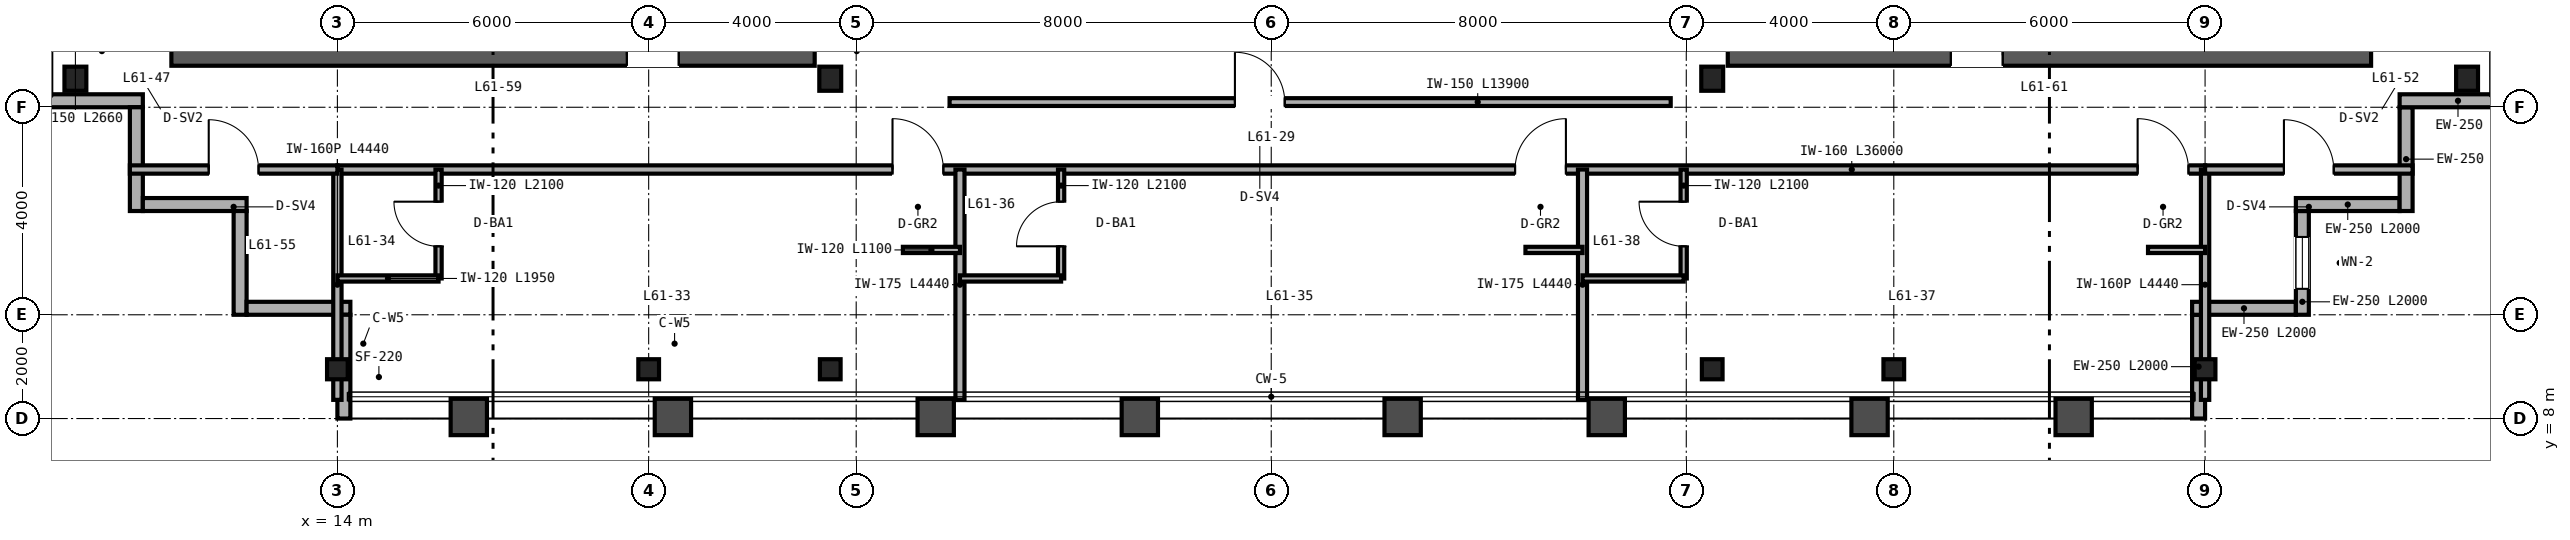
"""IFC4 building model, lengths in metres.
Left out: names, types, materials, properties, quantities, classifications, styles, units other than length and angle.
Written with IfcOpenShell. Run it as: python <this file> out.ifc"""

import sys

from ifc_helpers import new_model, si_unit, direction, frame, frame_2d, origin, origin_2d, place, context, subcontext, project, spatial, rectangle, i_section, extrude, source, transform, mapped, element, fill, save


model = new_model("IFC4")
c1 = context("Model", 3, precision=1e-05, world=origin(), true_north=direction((0.0, 1.0)))
c2 = subcontext(c1, "Body", "Model", "MODEL_VIEW")
j1 = project(units=[si_unit("LENGTHUNIT", "METRE"), si_unit("PLANEANGLEUNIT", "RADIAN")], contexts=[c1])
p1 = place(None, origin())
s1 = spatial("IfcSite", under=j1, at=p1, CompositionType="ELEMENT")
p2 = place(p1, origin())
s2 = spatial("IfcBuilding", under=s1, at=p2, CompositionType="ELEMENT")
p3 = place(p2, frame((0.0, 0.0, 243.6)))
s3 = spatial("IfcBuildingStorey", under=s2, at=p3, CompositionType="ELEMENT", Elevation=243.6)
p4 = place(p3, frame((10.8, 15.0, 0.0), z_axis=(0.0, 0.0, 1.0), x_axis=(1.0, 0.0, 0.0)))
e1 = element("IfcWall", 1, at=p4, inside=s3, PredefinedType="SHEAR", context=c2, shape_type="SweptSolid", body=[
    extrude(rectangle(XDim=12.4, YDim=0.4, at=frame_2d((6.2, 0.0))), origin(), (0.0, 0.0, 1.0), 3.28),
])
p5 = place(p4, frame((8.78, 0.0, 0.0)))
e2 = element("IfcOpeningElement", 2, at=p5, cuts=e1, PredefinedType="OPENING", context=c2, shape_type="SweptSolid", body=[
    extrude(rectangle(XDim=1.0, YDim=2.15, at=frame_2d((0.5, 1.075))), frame((0.0, 0.21, 0.0), z_axis=(0.0, -1.0, 0.0), x_axis=(1.0, 0.0, 0.0)), (0.0, 0.0, 1.0), 0.42),
])
p6 = place(p3, frame((40.8, 15.0, 0.0), z_axis=(0.0, 0.0, 1.0), x_axis=(1.0, 0.0, 0.0)))
e3 = element("IfcWall", 3, at=p6, inside=s3, PredefinedType="SHEAR", context=c2, shape_type="SweptSolid", body=[
    extrude(rectangle(XDim=12.4, YDim=0.4, at=frame_2d((6.2, 0.0))), origin(), (0.0, 0.0, 1.0), 3.28),
])
p7 = place(p6, frame((4.3, 0.0, 0.0)))
e4 = element("IfcOpeningElement", 4, at=p7, cuts=e3, PredefinedType="OPENING", context=c2, shape_type="SweptSolid", body=[
    extrude(rectangle(XDim=1.0, YDim=2.15, at=frame_2d((0.5, 1.075))), frame((0.0, 0.21, 0.0), z_axis=(0.0, -1.0, 0.0), x_axis=(1.0, 0.0, 0.0)), (0.0, 0.0, 1.0), 0.42),
])
m1 = source(origin(), c2, "Body", "SweptSolid", [
    extrude(i_section(OverallWidth=0.422, OverallDepth=0.465, WebThickness=0.045, FlangeThickness=0.073, FilletRadius=0.025, at=origin_2d()), origin(), (0.0, 0.0, 1.0), 3.28),
])
for number, where, z_axis, x_axis in (
    (5, (8.95, 14.55, 0.0), (0.0, 0.0, 1.0), (1.0, 0.0, 0.0)),
    (6, (23.5, 14.55, 0.0), (0.0, 0.0, 1.0), (1.0, 0.0, 0.0)),
    (7, (40.5, 14.55, 0.0), (0.0, 0.0, 1.0), (1.0, 0.0, 0.0)),
    (8, (55.05, 14.55, 0.0), (0.0, 0.0, 1.0), (1.0, 0.0, 0.0)),
):
    element("IfcColumn", number, at=place(p3, frame(where, z_axis=z_axis, x_axis=x_axis)), inside=s3, PredefinedType="COLUMN", context=c2, shape_type="MappedRepresentation", body=[
        mapped(m1, transform((0.0, 0.0, 0.0), scale=1.0)),
    ])
m2 = source(origin(), c2, "Body", "SweptSolid", [
    extrude(i_section(OverallWidth=0.399, OverallDepth=0.387, WebThickness=0.021, FlangeThickness=0.033, FilletRadius=0.025, at=origin_2d()), origin(), (0.0, 0.0, 1.0), 3.28),
])
for number, where, z_axis, x_axis in (
    (9, (14.0, 8.95, 0.0), (0.0, 0.0, 1.0), (1.0, 0.0, 0.0)),
    (10, (20.0, 8.95, 0.0), (0.0, 0.0, 1.0), (1.0, 0.0, 0.0)),
    (11, (23.5, 8.95, 0.0), (0.0, 0.0, 1.0), (1.0, 0.0, 0.0)),
    (12, (40.5, 8.95, 0.0), (0.0, 0.0, 1.0), (1.0, 0.0, 0.0)),
    (13, (44.0, 8.95, 0.0), (0.0, 0.0, 1.0), (1.0, 0.0, 0.0)),
    (14, (50.0, 8.95, 0.0), (0.0, 0.0, 1.0), (1.0, 0.0, 0.0)),
):
    element("IfcColumn", number, at=place(p3, frame(where, z_axis=z_axis, x_axis=x_axis)), inside=s3, PredefinedType="COLUMN", context=c2, shape_type="MappedRepresentation", body=[
        mapped(m2, transform((0.0, 0.0, 0.0), scale=1.0)),
    ])
p8 = place(p3, frame((49.875, 8.0, 0.0), z_axis=(0.0, 0.0, 1.0), x_axis=(0.0, 1.0, 0.0)))
e15 = element("IfcWall", 15, at=p8, inside=s3, PredefinedType="SOLIDWALL", context=c2, shape_type="SweptSolid", body=[
    extrude(rectangle(XDim=2.0, YDim=0.25, at=frame_2d((1.0, 0.0))), origin(), (0.0, 0.0, 1.0), 2.587),
])
p9 = place(p3, frame((49.75, 10.125, 0.0), z_axis=(0.0, 0.0, 1.0), x_axis=(1.0, 0.0, 0.0)))
e16 = element("IfcWall", 16, at=p9, inside=s3, PredefinedType="SOLIDWALL", context=c2, shape_type="SweptSolid", body=[
    extrude(rectangle(XDim=2.0, YDim=0.25, at=frame_2d((1.0, 0.0))), origin(), (0.0, 0.0, 1.0), 3.28),
])
p10 = place(p3, frame((51.875, 10.0, 0.0), z_axis=(0.0, 0.0, 1.0), x_axis=(0.0, 1.0, 0.0)))
e17 = element("IfcWall", 17, at=p10, inside=s3, PredefinedType="SOLIDWALL", context=c2, shape_type="SweptSolid", body=[
    extrude(rectangle(XDim=2.0, YDim=0.25, at=frame_2d((1.0, 0.0))), origin(), (0.0, 0.0, 1.0), 3.28),
])
p11 = place(p10, frame((0.5, 0.0, 0.85)))
e18 = element("IfcOpeningElement", 18, at=p11, cuts=e17, PredefinedType="OPENING", context=c2, shape_type="SweptSolid", body=[
    extrude(rectangle(XDim=1.0, YDim=1.9, at=frame_2d((0.5, 0.95))), frame((0.0, 0.135, 0.0), z_axis=(0.0, -1.0, 0.0), x_axis=(1.0, 0.0, 0.0)), (0.0, 0.0, 1.0), 0.27),
])
for number, where, z_axis, x_axis in (
    (19, (51.75, 12.125, 0.0), (0.0, 0.0, 1.0), (1.0, 0.0, 0.0)),
    (20, (53.875, 12.0, 0.0), (0.0, 0.0, 1.0), (0.0, 1.0, 0.0)),
):
    element("IfcWall", number, at=place(p3, frame(where, z_axis=z_axis, x_axis=x_axis)), inside=s3, PredefinedType="SOLIDWALL", context=c2, shape_type="SweptSolid", body=[
        extrude(rectangle(XDim=2.0, YDim=0.25, at=frame_2d((1.0, 0.0))), origin(), (0.0, 0.0, 1.0), 3.28),
    ])
for number, where, z_axis, x_axis in (
    (21, (53.75, 14.125, 0.0), (0.0, 0.0, 1.0), (1.0, 0.0, 0.0)),
    (22, (8.0, 14.125, 0.0), (0.0, 0.0, 1.0), (1.0, 0.0, 0.0)),
):
    element("IfcWall", number, at=place(p3, frame(where, z_axis=z_axis, x_axis=x_axis)), inside=s3, PredefinedType="SOLIDWALL", context=c2, shape_type="SweptSolid", body=[
        extrude(rectangle(XDim=2.25, YDim=0.25, at=frame_2d((1.125, 0.0))), origin(), (0.0, 0.0, 1.0), 3.28),
    ])
for number, where, z_axis, x_axis in (
    (23, (10.125, 14.0, 0.0), (0.0, 0.0, 1.0), (0.0, -1.0, 0.0)),
    (24, (10.25, 12.125, 0.0), (0.0, 0.0, 1.0), (1.0, 0.0, 0.0)),
    (25, (12.125, 12.0, 0.0), (0.0, 0.0, 1.0), (0.0, -1.0, 0.0)),
    (26, (12.25, 10.125, 0.0), (0.0, 0.0, 1.0), (1.0, 0.0, 0.0)),
):
    element("IfcWall", number, at=place(p3, frame(where, z_axis=z_axis, x_axis=x_axis)), inside=s3, PredefinedType="SOLIDWALL", context=c2, shape_type="SweptSolid", body=[
        extrude(rectangle(XDim=2.0, YDim=0.25, at=frame_2d((1.0, 0.0))), origin(), (0.0, 0.0, 1.0), 3.28),
    ])
p12 = place(p3, frame((14.125, 10.0, 0.0), z_axis=(0.0, 0.0, 1.0), x_axis=(0.0, -1.0, 0.0)))
e27 = element("IfcWall", 27, at=p12, inside=s3, PredefinedType="SOLIDWALL", context=c2, shape_type="SweptSolid", body=[
    extrude(rectangle(XDim=2.0, YDim=0.25, at=frame_2d((1.0, 0.0))), origin(), (0.0, 0.0, 1.0), 2.587),
])
p13 = place(p3, frame((25.8, 14.1, 0.0), z_axis=(0.0, 0.0, 1.0), x_axis=(1.0, 0.0, 0.0)))
e28 = element("IfcWall", 28, at=p13, inside=s3, PredefinedType="PARTITIONING", context=c2, shape_type="SweptSolid", body=[
    extrude(rectangle(XDim=13.9, YDim=0.15, at=frame_2d((6.95, 0.0))), origin(), (0.0, 0.0, 1.0), 3.28),
])
p14 = place(p13, frame((5.5, 0.0, 0.0)))
e29 = element("IfcOpeningElement", 29, at=p14, cuts=e28, PredefinedType="OPENING", context=c2, shape_type="SweptSolid", body=[
    extrude(rectangle(XDim=0.96, YDim=2.15, at=frame_2d((0.48, 1.075))), frame((0.0, 0.085, 0.0), z_axis=(0.0, -1.0, 0.0), x_axis=(1.0, 0.0, 0.0)), (0.0, 0.0, 1.0), 0.17),
])
p15 = place(p3, frame((14.0, 12.8, 0.0), z_axis=(0.0, 0.0, 1.0), x_axis=(1.0, 0.0, 0.0)))
e30 = element("IfcWall", 30, at=p15, inside=s3, PredefinedType="PARTITIONING", context=c2, shape_type="SweptSolid", body=[
    extrude(rectangle(XDim=36.0, YDim=0.16, at=frame_2d((18.0, 0.0))), origin(), (0.0, 0.0, 1.0), 2.823),
])
p16 = place(p15, frame((10.7, 0.0, 0.0)))
e31 = element("IfcOpeningElement", 31, at=p16, cuts=e30, PredefinedType="OPENING", context=c2, shape_type="SweptSolid", body=[
    extrude(rectangle(XDim=0.98, YDim=2.2, at=frame_2d((0.49, 1.1))), frame((0.0, 0.09, 0.0), z_axis=(0.0, -1.0, 0.0), x_axis=(1.0, 0.0, 0.0)), (0.0, 0.0, 1.0), 0.18),
])
p17 = place(p15, frame((22.7, 0.0, 0.0)))
e32 = element("IfcOpeningElement", 32, at=p17, cuts=e30, PredefinedType="OPENING", context=c2, shape_type="SweptSolid", body=[
    extrude(rectangle(XDim=0.98, YDim=2.2, at=frame_2d((0.49, 1.1))), frame((0.0, 0.09, 0.0), z_axis=(0.0, -1.0, 0.0), x_axis=(1.0, 0.0, 0.0)), (0.0, 0.0, 1.0), 0.18),
])
p18 = place(p15, frame((34.7, 0.0, 0.0)))
e33 = element("IfcOpeningElement", 33, at=p18, cuts=e30, PredefinedType="OPENING", context=c2, shape_type="SweptSolid", body=[
    extrude(rectangle(XDim=0.98, YDim=2.2, at=frame_2d((0.49, 1.1))), frame((0.0, 0.09, 0.0), z_axis=(0.0, -1.0, 0.0), x_axis=(1.0, 0.0, 0.0)), (0.0, 0.0, 1.0), 0.18),
])
for number, where, z_axis, x_axis in (
    (34, (14.0, 8.36, 0.0), (0.0, 0.0, 1.0), (0.0, 1.0, 0.0)),
    (35, (50.0, 8.36, 0.0), (0.0, 0.0, 1.0), (0.0, 1.0, 0.0)),
):
    element("IfcWall", number, at=place(p3, frame(where, z_axis=z_axis, x_axis=x_axis)), inside=s3, PredefinedType="PARTITIONING", context=c2, shape_type="SweptSolid", body=[
        extrude(rectangle(XDim=4.44, YDim=0.16, at=frame_2d((2.22, 0.0))), origin(), (0.0, 0.0, 1.0), 2.587),
    ])
p19 = place(p3, frame((26.0, 8.36, 0.0), z_axis=(0.0, 0.0, 1.0), x_axis=(0.0, 1.0, 0.0)))
e36 = element("IfcWall", 36, at=p19, inside=s3, PredefinedType="PARTITIONING", context=c2, shape_type="SweptSolid", body=[
    extrude(rectangle(XDim=4.44, YDim=0.175, at=frame_2d((2.22, 0.0))), origin(), (0.0, 0.0, 1.0), 2.36),
])
p20 = place(p3, frame((15.95, 10.7, 0.0), z_axis=(0.0, 0.0, 1.0), x_axis=(0.0, 1.0, 0.0)))
e37 = element("IfcWall", 37, at=p20, inside=s3, PredefinedType="PARTITIONING", context=c2, shape_type="SweptSolid", body=[
    extrude(rectangle(XDim=2.1, YDim=0.12, at=frame_2d((1.05, 0.0))), origin(), (0.0, 0.0, 1.0), 3.28),
])
p21 = place(p20, frame((0.62, 0.0, 0.0)))
e38 = element("IfcOpeningElement", 38, at=p21, cuts=e37, PredefinedType="OPENING", context=c2, shape_type="SweptSolid", body=[
    extrude(rectangle(XDim=0.86, YDim=2.1, at=frame_2d((0.43, 1.05))), frame((0.0, 0.07, 0.0), z_axis=(0.0, -1.0, 0.0), x_axis=(1.0, 0.0, 0.0)), (0.0, 0.0, 1.0), 0.14),
])
p22 = place(p3, frame((14.0, 10.7, 0.0), z_axis=(0.0, 0.0, 1.0), x_axis=(1.0, 0.0, 0.0)))
e39 = element("IfcWall", 39, at=p22, inside=s3, PredefinedType="PARTITIONING", context=c2, shape_type="SweptSolid", body=[
    extrude(rectangle(XDim=1.95, YDim=0.12, at=frame_2d((0.975, 0.0))), origin(), (0.0, 0.0, 1.0), 3.28),
])
p23 = place(p3, frame((24.9, 11.25, 0.0), z_axis=(0.0, 0.0, 1.0), x_axis=(1.0, 0.0, 0.0)))
e40 = element("IfcWall", 40, at=p23, inside=s3, PredefinedType="PARTITIONING", context=c2, shape_type="SweptSolid", body=[
    extrude(rectangle(XDim=1.1, YDim=0.12, at=frame_2d((0.55, 0.0))), origin(), (0.0, 0.0, 1.0), 3.28),
])
p24 = place(p3, frame((38.0, 8.36, 0.0), z_axis=(0.0, 0.0, 1.0), x_axis=(0.0, 1.0, 0.0)))
e41 = element("IfcWall", 41, at=p24, inside=s3, PredefinedType="PARTITIONING", context=c2, shape_type="SweptSolid", body=[
    extrude(rectangle(XDim=4.44, YDim=0.175, at=frame_2d((2.22, 0.0))), origin(), (0.0, 0.0, 1.0), 2.36),
])
p25 = place(p3, frame((27.95, 10.7, 0.0), z_axis=(0.0, 0.0, 1.0), x_axis=(0.0, 1.0, 0.0)))
e42 = element("IfcWall", 42, at=p25, inside=s3, PredefinedType="PARTITIONING", context=c2, shape_type="SweptSolid", body=[
    extrude(rectangle(XDim=2.1, YDim=0.12, at=frame_2d((1.05, 0.0))), origin(), (0.0, 0.0, 1.0), 3.28),
])
p26 = place(p25, frame((0.62, 0.0, 0.0)))
e43 = element("IfcOpeningElement", 43, at=p26, cuts=e42, PredefinedType="OPENING", context=c2, shape_type="SweptSolid", body=[
    extrude(rectangle(XDim=0.86, YDim=2.1, at=frame_2d((0.43, 1.05))), frame((0.0, 0.07, 0.0), z_axis=(0.0, -1.0, 0.0), x_axis=(1.0, 0.0, 0.0)), (0.0, 0.0, 1.0), 0.14),
])
p27 = place(p3, frame((26.0, 10.7, 0.0), z_axis=(0.0, 0.0, 1.0), x_axis=(1.0, 0.0, 0.0)))
e44 = element("IfcWall", 44, at=p27, inside=s3, PredefinedType="PARTITIONING", context=c2, shape_type="SweptSolid", body=[
    extrude(rectangle(XDim=1.95, YDim=0.12, at=frame_2d((0.975, 0.0))), origin(), (0.0, 0.0, 1.0), 3.28),
])
p28 = place(p3, frame((36.9, 11.25, 0.0), z_axis=(0.0, 0.0, 1.0), x_axis=(1.0, 0.0, 0.0)))
e45 = element("IfcWall", 45, at=p28, inside=s3, PredefinedType="PARTITIONING", context=c2, shape_type="SweptSolid", body=[
    extrude(rectangle(XDim=1.1, YDim=0.12, at=frame_2d((0.55, 0.0))), origin(), (0.0, 0.0, 1.0), 3.28),
])
p29 = place(p3, frame((39.95, 10.7, 0.0), z_axis=(0.0, 0.0, 1.0), x_axis=(0.0, 1.0, 0.0)))
e46 = element("IfcWall", 46, at=p29, inside=s3, PredefinedType="PARTITIONING", context=c2, shape_type="SweptSolid", body=[
    extrude(rectangle(XDim=2.1, YDim=0.12, at=frame_2d((1.05, 0.0))), origin(), (0.0, 0.0, 1.0), 3.28),
])
p30 = place(p29, frame((0.62, 0.0, 0.0)))
e47 = element("IfcOpeningElement", 47, at=p30, cuts=e46, PredefinedType="OPENING", context=c2, shape_type="SweptSolid", body=[
    extrude(rectangle(XDim=0.86, YDim=2.1, at=frame_2d((0.43, 1.05))), frame((0.0, 0.07, 0.0), z_axis=(0.0, -1.0, 0.0), x_axis=(1.0, 0.0, 0.0)), (0.0, 0.0, 1.0), 0.14),
])
p31 = place(p3, frame((38.0, 10.7, 0.0), z_axis=(0.0, 0.0, 1.0), x_axis=(1.0, 0.0, 0.0)))
e48 = element("IfcWall", 48, at=p31, inside=s3, PredefinedType="PARTITIONING", context=c2, shape_type="SweptSolid", body=[
    extrude(rectangle(XDim=1.95, YDim=0.12, at=frame_2d((0.975, 0.0))), origin(), (0.0, 0.0, 1.0), 3.28),
])
p32 = place(p3, frame((48.9, 11.25, 0.0), z_axis=(0.0, 0.0, 1.0), x_axis=(1.0, 0.0, 0.0)))
e49 = element("IfcWall", 49, at=p32, inside=s3, PredefinedType="PARTITIONING", context=c2, shape_type="SweptSolid", body=[
    extrude(rectangle(XDim=1.1, YDim=0.12, at=frame_2d((0.55, 0.0))), origin(), (0.0, 0.0, 1.0), 3.28),
])
p33 = place(p3, frame((10.0, 12.8, 0.0), z_axis=(0.0, 0.0, 1.0), x_axis=(1.0, 0.0, 0.0)))
e50 = element("IfcWall", 50, at=p33, inside=s3, PredefinedType="PARTITIONING", context=c2, shape_type="SweptSolid", body=[
    extrude(rectangle(XDim=4.0, YDim=0.16, at=frame_2d((2.0, 0.0))), origin(), (0.0, 0.0, 1.0), 3.28),
])
p34 = place(p33, frame((1.52, 0.0, 0.0)))
e51 = element("IfcOpeningElement", 51, at=p34, cuts=e50, PredefinedType="OPENING", context=c2, shape_type="SweptSolid", body=[
    extrude(rectangle(XDim=0.96, YDim=2.15, at=frame_2d((0.48, 1.075))), frame((0.0, 0.09, 0.0), z_axis=(0.0, -1.0, 0.0), x_axis=(1.0, 0.0, 0.0)), (0.0, 0.0, 1.0), 0.18),
])
p35 = place(p3, frame((50.0, 12.8, 0.0), z_axis=(0.0, 0.0, 1.0), x_axis=(1.0, 0.0, 0.0)))
e52 = element("IfcWall", 52, at=p35, inside=s3, PredefinedType="PARTITIONING", context=c2, shape_type="SweptSolid", body=[
    extrude(rectangle(XDim=4.0, YDim=0.16, at=frame_2d((2.0, 0.0))), origin(), (0.0, 0.0, 1.0), 3.28),
])
p36 = place(p35, frame((1.52, 0.0, 0.0)))
e53 = element("IfcOpeningElement", 53, at=p36, cuts=e52, PredefinedType="OPENING", context=c2, shape_type="SweptSolid", body=[
    extrude(rectangle(XDim=0.96, YDim=2.15, at=frame_2d((0.48, 1.075))), frame((0.0, 0.09, 0.0), z_axis=(0.0, -1.0, 0.0), x_axis=(1.0, 0.0, 0.0)), (0.0, 0.0, 1.0), 0.18),
])
m3 = source(origin(), c2, "Body", "SweptSolid", [
    extrude(rectangle(XDim=1.0, YDim=1.9, at=frame_2d((0.5, 0.95))), frame((0.0, 0.03, 0.0), z_axis=(0.0, -1.0, 0.0), x_axis=(1.0, 0.0, 0.0)), (0.0, 0.0, 1.0), 0.06),
])
p37 = place(p11, origin())
e54 = element("IfcWindow", 54, at=p37, inside=s3, PartitioningType="SINGLE_PANEL", PredefinedType="WINDOW", context=c2, shape_type="MappedRepresentation", body=[
    mapped(m3, transform((0.0, 0.0, 0.0), scale=1.0)),
])
fill(e18, e54)
m4 = source(origin(), c2, "Body", "SweptSolid", [
    extrude(rectangle(XDim=1.0, YDim=2.15, at=frame_2d((0.5, 1.075))), frame((0.0, 0.025, 0.0), z_axis=(0.0, -1.0, 0.0), x_axis=(1.0, 0.0, 0.0)), (0.0, 0.0, 1.0), 0.05),
])
p38 = place(p5, origin())
e55 = element("IfcDoor", 55, at=p38, inside=s3, OperationType="SINGLE_SWING_LEFT", PredefinedType="DOOR", context=c2, shape_type="MappedRepresentation", body=[
    mapped(m4, transform((0.0, 0.0, 0.0), scale=1.0)),
])
fill(e2, e55)
p39 = place(p7, origin())
e56 = element("IfcDoor", 56, at=p39, inside=s3, OperationType="SINGLE_SWING_RIGHT", PredefinedType="DOOR", context=c2, shape_type="MappedRepresentation", body=[
    mapped(m4, transform((0.0, 0.0, 0.0), scale=1.0)),
])
fill(e4, e56)
m5 = source(origin(), c2, "Body", "SweptSolid", [
    extrude(rectangle(XDim=0.96, YDim=2.15, at=frame_2d((0.48, 1.075))), frame((0.0, 0.025, 0.0), z_axis=(0.0, -1.0, 0.0), x_axis=(1.0, 0.0, 0.0)), (0.0, 0.0, 1.0), 0.05),
])
p40 = place(p14, origin())
e57 = element("IfcDoor", 57, at=p40, inside=s3, OperationType="SINGLE_SWING_LEFT", PredefinedType="DOOR", context=c2, shape_type="MappedRepresentation", body=[
    mapped(m5, transform((0.0, 0.0, 0.0), scale=1.0)),
])
fill(e29, e57)
m6 = source(origin(), c2, "Body", "SweptSolid", [
    extrude(rectangle(XDim=0.86, YDim=2.1, at=frame_2d((0.43, 1.05))), frame((0.0, 0.025, 0.0), z_axis=(0.0, -1.0, 0.0), x_axis=(1.0, 0.0, 0.0)), (0.0, 0.0, 1.0), 0.05),
])
p41 = place(p21, origin())
e58 = element("IfcDoor", 58, at=p41, inside=s3, OperationType="SINGLE_SWING_RIGHT", PredefinedType="DOOR", context=c2, shape_type="MappedRepresentation", body=[
    mapped(m6, transform((0.0, 0.0, 0.0), scale=1.0)),
])
fill(e38, e58)
p42 = place(p26, origin())
e59 = element("IfcDoor", 59, at=p42, inside=s3, OperationType="SINGLE_SWING_LEFT", PredefinedType="DOOR", context=c2, shape_type="MappedRepresentation", body=[
    mapped(m6, transform((0.0, 0.0, 0.0), scale=1.0)),
])
fill(e43, e59)
p43 = place(p30, origin())
e60 = element("IfcDoor", 60, at=p43, inside=s3, OperationType="SINGLE_SWING_RIGHT", PredefinedType="DOOR", context=c2, shape_type="MappedRepresentation", body=[
    mapped(m6, transform((0.0, 0.0, 0.0), scale=1.0)),
])
fill(e47, e60)
m7 = source(origin(), c2, "Body", "SweptSolid", [
    extrude(rectangle(XDim=0.98, YDim=2.2, at=frame_2d((0.49, 1.1))), frame((0.0, 0.025, 0.0), z_axis=(0.0, -1.0, 0.0), x_axis=(1.0, 0.0, 0.0)), (0.0, 0.0, 1.0), 0.05),
])
p44 = place(p16, origin())
e61 = element("IfcDoor", 61, at=p44, inside=s3, OperationType="SINGLE_SWING_LEFT", PredefinedType="DOOR", context=c2, shape_type="MappedRepresentation", body=[
    mapped(m7, transform((0.0, 0.0, 0.0), scale=1.0)),
])
fill(e31, e61)
p45 = place(p17, origin())
e62 = element("IfcDoor", 62, at=p45, inside=s3, OperationType="SINGLE_SWING_RIGHT", PredefinedType="DOOR", context=c2, shape_type="MappedRepresentation", body=[
    mapped(m7, transform((0.0, 0.0, 0.0), scale=1.0)),
])
fill(e32, e62)
p46 = place(p18, origin())
e63 = element("IfcDoor", 63, at=p46, inside=s3, OperationType="SINGLE_SWING_LEFT", PredefinedType="DOOR", context=c2, shape_type="MappedRepresentation", body=[
    mapped(m7, transform((0.0, 0.0, 0.0), scale=1.0)),
])
fill(e33, e63)
p47 = place(p34, origin())
e64 = element("IfcDoor", 64, at=p47, inside=s3, OperationType="SINGLE_SWING_LEFT", PredefinedType="DOOR", context=c2, shape_type="MappedRepresentation", body=[
    mapped(m5, transform((0.0, 0.0, 0.0), scale=1.0)),
])
fill(e51, e64)
p48 = place(p36, origin())
e65 = element("IfcDoor", 65, at=p48, inside=s3, OperationType="SINGLE_SWING_LEFT", PredefinedType="DOOR", context=c2, shape_type="MappedRepresentation", body=[
    mapped(m5, transform((0.0, 0.0, 0.0), scale=1.0)),
])
fill(e53, e65)
save(model, sys.argv[1])
